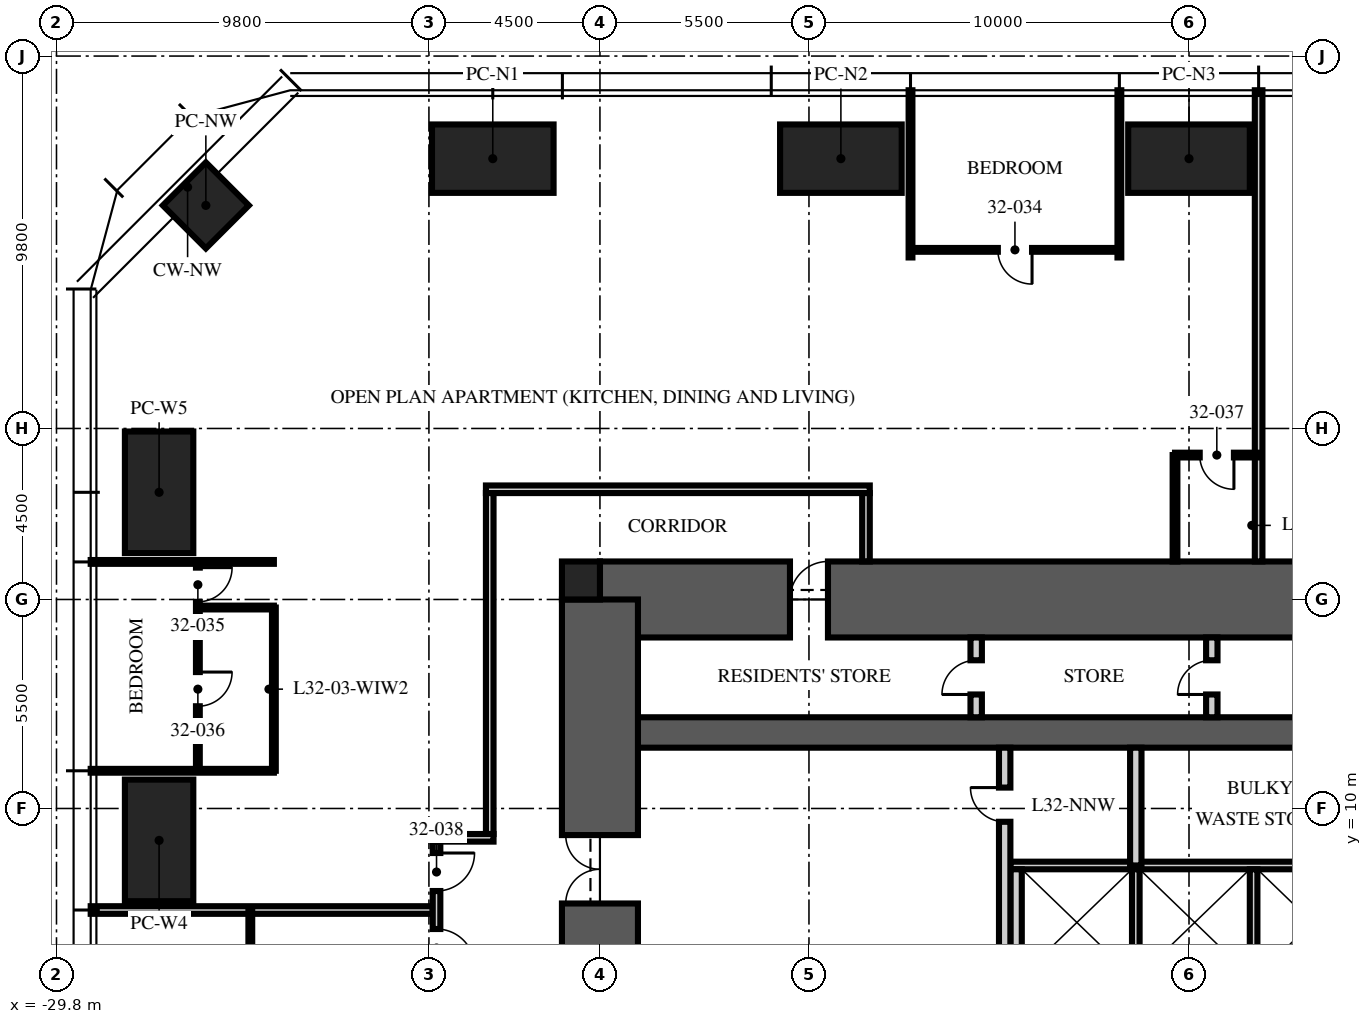
"""IFC4 building model, lengths in metres.
Left out: names, types, materials, properties, quantities, classifications, styles, units other than length and angle.
Written with IfcOpenShell. Run it as: python <this file> out.ifc"""

import sys

from ifc_helpers import new_model, si_unit, direction, frame, frame_2d, origin, origin_2d, place, context, subcontext, project, spatial, rectangle, extrude, element, fill, save


model = new_model("IFC4")
c1 = context("Model", 3, precision=1e-05, world=origin(), true_north=direction((0.0, 1.0)))
c2 = subcontext(c1, "Body", "Model", "MODEL_VIEW")
j1 = project(units=[si_unit("LENGTHUNIT", "METRE"), si_unit("PLANEANGLEUNIT", "RADIAN")], contexts=[c1])
p1 = place(None, origin())
s1 = spatial("IfcSite", under=j1, at=p1, CompositionType="ELEMENT")
p2 = place(p1, origin())
s2 = spatial("IfcBuilding", under=s1, at=p2, CompositionType="ELEMENT")
p3 = place(p2, frame((0.0, 0.0, 129.75)))
s3 = spatial("IfcBuildingStorey", under=s2, at=p3, CompositionType="ELEMENT", Elevation=129.75)
p4 = place(p3, frame((-15.5, 15.5, -0.25), z_axis=(0.0, 0.0, 1.0), x_axis=(1.0, 0.0, 0.0)))
e1 = element("IfcWall", 1, at=p4, inside=s3, PredefinedType="SHEAR", context=c2, shape_type="SweptSolid", body=[
    extrude(rectangle(XDim=31.0, YDim=2.0, at=frame_2d((15.5, 0.0))), origin(), (0.0, 0.0, 1.0), 3.75),
])
p5 = place(p4, frame((5.0, 0.0, 0.25)))
e2 = element("IfcOpeningElement", 2, at=p5, cuts=e1, PredefinedType="OPENING", context=c2, shape_type="SweptSolid", body=[
    extrude(rectangle(XDim=1.0, YDim=2.1, at=frame_2d((0.5, 1.05))), frame((0.0, 1.01, 0.0), z_axis=(0.0, -1.0, 0.0), x_axis=(1.0, 0.0, 0.0)), (0.0, 0.0, 1.0), 2.02),
])
p6 = place(p3, frame((-15.5, 12.0, -0.25), z_axis=(0.0, 0.0, 1.0), x_axis=(1.0, 0.0, 0.0)))
e3 = element("IfcWall", 3, at=p6, inside=s3, PredefinedType="SHEAR", context=c2, shape_type="SweptSolid", body=[
    extrude(rectangle(XDim=31.0, YDim=0.8, at=frame_2d((15.5, 0.0))), origin(), (0.0, 0.0, 1.0), 3.75),
])
p7 = place(p3, frame((-15.5, -15.5, -0.25), z_axis=(0.0, 0.0, 1.0), x_axis=(0.0, 1.0, 0.0)))
e4 = element("IfcWall", 4, at=p7, inside=s3, PredefinedType="SHEAR", context=c2, shape_type="SweptSolid", body=[
    extrude(rectangle(XDim=31.0, YDim=2.0, at=frame_2d((15.5, 0.0))), origin(), (0.0, 0.0, 1.0), 3.75),
])
p8 = place(p7, frame((6.5, 0.0, 0.25)))
e5 = element("IfcOpeningElement", 5, at=p8, cuts=e4, PredefinedType="OPENING", context=c2, shape_type="SweptSolid", body=[
    extrude(rectangle(XDim=1.2, YDim=2.1, at=frame_2d((0.6, 1.05))), frame((0.0, 1.01, 0.0), z_axis=(0.0, -1.0, 0.0), x_axis=(1.0, 0.0, 0.0)), (0.0, 0.0, 1.0), 2.02),
])
p9 = place(p7, frame((23.0, 0.0, 0.25)))
e6 = element("IfcOpeningElement", 6, at=p9, cuts=e4, PredefinedType="OPENING", context=c2, shape_type="SweptSolid", body=[
    extrude(rectangle(XDim=1.8, YDim=2.1, at=frame_2d((0.9, 1.05))), frame((0.0, 1.01, 0.0), z_axis=(0.0, -1.0, 0.0), x_axis=(1.0, 0.0, 0.0)), (0.0, 0.0, 1.0), 2.02),
])
p10 = place(p3, frame((-16.0, 16.0, -0.25), z_axis=(0.0, 0.0, 1.0), x_axis=(1.0, 0.0, 0.0)))
e7 = element("IfcColumn", 7, at=p10, inside=s3, PredefinedType="COLUMN", context=c2, shape_type="SweptSolid", body=[
    extrude(rectangle(XDim=1.0, YDim=1.0, at=origin_2d()), origin(), (0.0, 0.0, 1.0), 3.75),
])
for number, where, z_axis, x_axis in (
    (8, (-18.32, 27.1, 0.0), (0.0, 0.0, 1.0), (1.0, 0.0, 0.0)),
    (9, (-9.16, 27.1, 0.0), (0.0, 0.0, 1.0), (1.0, 0.0, 0.0)),
    (10, (0.0, 27.1, 0.0), (0.0, 0.0, 1.0), (1.0, 0.0, 0.0)),
    (11, (-27.1, 9.16, 0.0), (0.0, 0.0, 1.0), (0.0, 1.0, 0.0)),
    (12, (-27.1, 18.32, 0.0), (0.0, 0.0, 1.0), (0.0, 1.0, 0.0)),
):
    element("IfcColumn", number, at=place(p3, frame(where, z_axis=z_axis, x_axis=x_axis)), inside=s3, PredefinedType="COLUMN", context=c2, shape_type="SweptSolid", body=[
        extrude(rectangle(XDim=3.2, YDim=1.8, at=origin_2d()), origin(), (0.0, 0.0, 1.0), 3.75),
    ])
p11 = place(p3, frame((-25.87, 25.87, 0.0), z_axis=(0.0, 0.0, 1.0), x_axis=(0.707106781187, 0.707106781187, 0.0)))
e13 = element("IfcColumn", 13, at=p11, inside=s3, PredefinedType="COLUMN", context=c2, shape_type="SweptSolid", body=[
    extrude(rectangle(XDim=1.6, YDim=1.6, at=origin_2d()), origin(), (0.0, 0.0, 1.0), 3.75),
])
p12 = place(p3, frame((-4.7, 8.5, 0.0), z_axis=(0.0, 0.0, 1.0), x_axis=(1.0, 0.0, 0.0)))
e14 = element("IfcWall", 14, at=p12, inside=s3, PredefinedType="PARTITIONING", context=c2, shape_type="SweptSolid", body=[
    extrude(rectangle(XDim=9.7, YDim=0.2, at=frame_2d((4.85, 0.0))), origin(), (0.0, 0.0, 1.0), 3.5),
])
p13 = place(p3, frame((-4.55, 5.6, 0.0), z_axis=(0.0, 0.0, 1.0), x_axis=(0.0, 1.0, 0.0)))
e15 = element("IfcWall", 15, at=p13, inside=s3, PredefinedType="PARTITIONING", context=c2, shape_type="SweptSolid", body=[
    extrude(rectangle(XDim=2.8, YDim=0.3, at=frame_2d((1.4, 0.0))), origin(), (0.0, 0.0, 1.0), 3.5),
])
for number, where, z_axis, x_axis in (
    (16, (-1.4, 5.6, 0.0), (0.0, 0.0, 1.0), (0.0, 1.0, 0.0)),
    (17, (1.7, 5.6, 0.0), (0.0, 0.0, 1.0), (0.0, 1.0, 0.0)),
):
    element("IfcWall", number, at=place(p3, frame(where, z_axis=z_axis, x_axis=x_axis)), inside=s3, PredefinedType="PARTITIONING", context=c2, shape_type="SweptSolid", body=[
        extrude(rectangle(XDim=2.8, YDim=0.2, at=frame_2d((1.4, 0.0))), origin(), (0.0, 0.0, 1.0), 3.5),
    ])
p14 = place(p3, frame((-4.85, 5.3, 0.0), z_axis=(0.0, 0.0, 1.0), x_axis=(0.0, 1.0, 0.0)))
e18 = element("IfcWall", 18, at=p14, inside=s3, PredefinedType="PARTITIONING", context=c2, shape_type="SweptSolid", body=[
    extrude(rectangle(XDim=6.3, YDim=0.3, at=frame_2d((3.15, 0.0))), origin(), (0.0, 0.0, 1.0), 3.5),
])
p15 = place(p14, frame((4.35, 0.0, 0.0)))
e19 = element("IfcOpeningElement", 19, at=p15, cuts=e18, PredefinedType="OPENING", context=c2, shape_type="SweptSolid", body=[
    extrude(rectangle(XDim=0.9, YDim=2.1, at=frame_2d((0.45, 1.05))), frame((0.0, 0.16, 0.0), z_axis=(0.0, -1.0, 0.0), x_axis=(1.0, 0.0, 0.0)), (0.0, 0.0, 1.0), 0.32),
])
p16 = place(p3, frame((-1.4, 8.5, 0.0), z_axis=(0.0, 0.0, 1.0), x_axis=(0.0, 1.0, 0.0)))
e20 = element("IfcWall", 20, at=p16, inside=s3, PredefinedType="PARTITIONING", context=c2, shape_type="SweptSolid", body=[
    extrude(rectangle(XDim=3.1, YDim=0.3, at=frame_2d((1.55, 0.0))), origin(), (0.0, 0.0, 1.0), 3.5),
])
p17 = place(p3, frame((-5.6, 12.4, 0.0), z_axis=(0.0, 0.0, 1.0), x_axis=(0.0, 1.0, 0.0)))
e21 = element("IfcWall", 21, at=p17, inside=s3, PredefinedType="PARTITIONING", context=c2, shape_type="SweptSolid", body=[
    extrude(rectangle(XDim=2.1, YDim=0.3, at=frame_2d((1.05, 0.0))), origin(), (0.0, 0.0, 1.0), 3.5),
])
p18 = place(p17, frame((0.6, 0.0, 0.0)))
e22 = element("IfcOpeningElement", 22, at=p18, cuts=e21, PredefinedType="OPENING", context=c2, shape_type="SweptSolid", body=[
    extrude(rectangle(XDim=0.9, YDim=2.1, at=frame_2d((0.45, 1.05))), frame((0.0, 0.16, 0.0), z_axis=(0.0, -1.0, 0.0), x_axis=(1.0, 0.0, 0.0)), (0.0, 0.0, 1.0), 0.32),
])
p19 = place(p3, frame((0.6, 12.4, 0.0), z_axis=(0.0, 0.0, 1.0), x_axis=(0.0, 1.0, 0.0)))
e23 = element("IfcWall", 23, at=p19, inside=s3, PredefinedType="PARTITIONING", context=c2, shape_type="SweptSolid", body=[
    extrude(rectangle(XDim=2.1, YDim=0.3, at=frame_2d((1.05, 0.0))), origin(), (0.0, 0.0, 1.0), 3.5),
])
p20 = place(p19, frame((0.6, 0.0, 0.0)))
e24 = element("IfcOpeningElement", 24, at=p20, cuts=e23, PredefinedType="OPENING", context=c2, shape_type="SweptSolid", body=[
    extrude(rectangle(XDim=0.9, YDim=2.1, at=frame_2d((0.45, 1.05))), frame((0.0, 0.16, 0.0), z_axis=(0.0, -1.0, 0.0), x_axis=(1.0, 0.0, 0.0)), (0.0, 0.0, 1.0), 0.32),
])
p21 = place(p3, frame((-18.5, 18.4, 0.0), z_axis=(0.0, 0.0, 1.0), x_axis=(1.0, 0.0, 0.0)))
e25 = element("IfcWall", 25, at=p21, inside=s3, PredefinedType="PARTITIONING", context=c2, shape_type="SweptSolid", body=[
    extrude(rectangle(XDim=10.1, YDim=0.2, at=frame_2d((5.05, 0.0))), origin(), (0.0, 0.0, 1.0), 2.3),
])
p22 = place(p3, frame((-8.5, 18.3, 0.0), z_axis=(0.0, 0.0, 1.0), x_axis=(0.0, -1.0, 0.0)))
e26 = element("IfcWall", 26, at=p22, inside=s3, PredefinedType="PARTITIONING", context=c2, shape_type="SweptSolid", body=[
    extrude(rectangle(XDim=1.8, YDim=0.2, at=frame_2d((0.9, 0.0))), origin(), (0.0, 0.0, 1.0), 3.5),
])
p23 = place(p3, frame((1.832, 16.5, 0.0), z_axis=(0.0, 0.0, 1.0), x_axis=(0.0, 1.0, 0.0)))
e27 = element("IfcWall", 27, at=p23, inside=s3, PredefinedType="PARTITIONING", context=c2, shape_type="SweptSolid", body=[
    extrude(rectangle(XDim=12.4, YDim=0.2, at=frame_2d((6.2, 0.0))), origin(), (0.0, 0.0, 1.0), 2.81),
])
for number, where, z_axis, x_axis in (
    (28, (-1.832, 24.5, 0.0), (0.0, 0.0, 1.0), (0.0, 1.0, 0.0)),
    (29, (-7.328, 24.5, 0.0), (0.0, 0.0, 1.0), (0.0, 1.0, 0.0)),
):
    element("IfcWall", number, at=place(p3, frame(where, z_axis=z_axis, x_axis=x_axis)), inside=s3, PredefinedType="PARTITIONING", context=c2, shape_type="SweptSolid", body=[
        extrude(rectangle(XDim=4.4, YDim=0.1, at=frame_2d((2.2, 0.0))), origin(), (0.0, 0.0, 1.0), 2.81),
    ])
for number, where, z_axis, x_axis in (
    (30, (-24.08, 16.488, 0.0), (0.0, 0.0, 1.0), (-1.0, 0.0, 0.0)),
    (31, (-24.08, 10.992, 0.0), (0.0, 0.0, 1.0), (-1.0, 0.0, 0.0)),
):
    element("IfcWall", number, at=place(p3, frame(where, z_axis=z_axis, x_axis=x_axis)), inside=s3, PredefinedType="PARTITIONING", context=c2, shape_type="SweptSolid", body=[
        extrude(rectangle(XDim=4.82, YDim=0.1, at=frame_2d((2.41, 0.0))), origin(), (0.0, 0.0, 1.0), 2.81),
    ])
p24 = place(p3, frame((-19.9, 7.328, 0.0), z_axis=(0.0, 0.0, 1.0), x_axis=(-1.0, 0.0, 0.0)))
e32 = element("IfcWall", 32, at=p24, inside=s3, PredefinedType="PARTITIONING", context=c2, shape_type="SweptSolid", body=[
    extrude(rectangle(XDim=9.0, YDim=0.2, at=frame_2d((4.5, 0.0))), origin(), (0.0, 0.0, 1.0), 2.81),
])
p25 = place(p3, frame((-1.832, 24.7, 0.0), z_axis=(0.0, 0.0, 1.0), x_axis=(-1.0, 0.0, 0.0)))
e33 = element("IfcWall", 33, at=p25, inside=s3, PredefinedType="PARTITIONING", context=c2, shape_type="SweptSolid", body=[
    extrude(rectangle(XDim=5.496, YDim=0.1, at=frame_2d((2.748, 0.0))), origin(), (0.0, 0.0, 1.0), 2.81),
])
p26 = place(p25, frame((2.298, 0.0, 0.0)))
e34 = element("IfcOpeningElement", 34, at=p26, cuts=e33, PredefinedType="OPENING", context=c2, shape_type="SweptSolid", body=[
    extrude(rectangle(XDim=0.9, YDim=2.1, at=frame_2d((0.45, 1.05))), frame((0.0, 0.06, 0.0), z_axis=(0.0, -1.0, 0.0), x_axis=(1.0, 0.0, 0.0)), (0.0, 0.0, 1.0), 0.12),
])
p27 = place(p3, frame((-26.08, 16.488, 0.0), z_axis=(0.0, 0.0, 1.0), x_axis=(0.0, -1.0, 0.0)))
e35 = element("IfcWall", 35, at=p27, inside=s3, PredefinedType="PARTITIONING", context=c2, shape_type="SweptSolid", body=[
    extrude(rectangle(XDim=5.496, YDim=0.1, at=frame_2d((2.748, 0.0))), origin(), (0.0, 0.0, 1.0), 2.81),
])
p28 = place(p27, frame((0.15, 0.0, 0.0)))
e36 = element("IfcOpeningElement", 36, at=p28, cuts=e35, PredefinedType="OPENING", context=c2, shape_type="SweptSolid", body=[
    extrude(rectangle(XDim=0.9, YDim=2.1, at=frame_2d((0.45, 1.05))), frame((0.0, 0.06, 0.0), z_axis=(0.0, -1.0, 0.0), x_axis=(1.0, 0.0, 0.0)), (0.0, 0.0, 1.0), 0.12),
])
p29 = place(p27, frame((2.898, 0.0, 0.0)))
e37 = element("IfcOpeningElement", 37, at=p29, cuts=e35, PredefinedType="OPENING", context=c2, shape_type="SweptSolid", body=[
    extrude(rectangle(XDim=0.9, YDim=2.1, at=frame_2d((0.45, 1.05))), frame((0.0, 0.06, 0.0), z_axis=(0.0, -1.0, 0.0), x_axis=(1.0, 0.0, 0.0)), (0.0, 0.0, 1.0), 0.12),
])
p30 = place(p3, frame((-24.08, 15.288, 0.0), z_axis=(0.0, 0.0, 1.0), x_axis=(-1.0, 0.0, 0.0)))
e38 = element("IfcWall", 38, at=p30, inside=s3, PredefinedType="PARTITIONING", context=c2, shape_type="SweptSolid", body=[
    extrude(rectangle(XDim=2.0, YDim=0.1, at=frame_2d((1.0, 0.0))), origin(), (0.0, 0.0, 1.0), 3.5),
])
p31 = place(p3, frame((-24.08, 15.288, 0.0), z_axis=(0.0, 0.0, 1.0), x_axis=(0.0, -1.0, 0.0)))
e39 = element("IfcWall", 39, at=p31, inside=s3, PredefinedType="PARTITIONING", context=c2, shape_type="SweptSolid", body=[
    extrude(rectangle(XDim=4.296, YDim=0.1, at=frame_2d((2.148, 0.0))), origin(), (0.0, 0.0, 1.0), 2.81),
])
p32 = place(p3, frame((1.832, 19.3, 0.0), z_axis=(0.0, 0.0, 1.0), x_axis=(-1.0, 0.0, 0.0)))
e40 = element("IfcWall", 40, at=p32, inside=s3, PredefinedType="PARTITIONING", context=c2, shape_type="SweptSolid", body=[
    extrude(rectangle(XDim=2.2, YDim=0.125, at=frame_2d((1.1, 0.0))), origin(), (0.0, 0.0, 1.0), 2.7),
])
p33 = place(p32, frame((0.65, 0.0, 0.0)))
e41 = element("IfcOpeningElement", 41, at=p33, cuts=e40, PredefinedType="OPENING", context=c2, shape_type="SweptSolid", body=[
    extrude(rectangle(XDim=0.9, YDim=2.1, at=frame_2d((0.45, 1.05))), frame((0.0, 0.073, 0.0), z_axis=(0.0, -1.0, 0.0), x_axis=(1.0, 0.0, 0.0)), (0.0, 0.0, 1.0), 0.145),
])
p34 = place(p3, frame((-0.368, 16.5, 0.0), z_axis=(0.0, 0.0, 1.0), x_axis=(0.0, 1.0, 0.0)))
e42 = element("IfcWall", 42, at=p34, inside=s3, PredefinedType="PARTITIONING", context=c2, shape_type="SweptSolid", body=[
    extrude(rectangle(XDim=2.8, YDim=0.125, at=frame_2d((1.4, 0.0))), origin(), (0.0, 0.0, 1.0), 3.5),
])
p35 = place(p3, frame((-24.7, 7.328, 0.0), z_axis=(0.0, 0.0, 1.0), x_axis=(0.0, -1.0, 0.0)))
e43 = element("IfcWall", 43, at=p35, inside=s3, PredefinedType="PARTITIONING", context=c2, shape_type="SweptSolid", body=[
    extrude(rectangle(XDim=5.496, YDim=0.1, at=frame_2d((2.748, 0.0))), origin(), (0.0, 0.0, 1.0), 2.81),
])
p36 = place(p35, frame((2.298, 0.0, 0.0)))
e44 = element("IfcOpeningElement", 44, at=p36, cuts=e43, PredefinedType="OPENING", context=c2, shape_type="SweptSolid", body=[
    extrude(rectangle(XDim=0.9, YDim=2.1, at=frame_2d((0.45, 1.05))), frame((0.0, 0.06, 0.0), z_axis=(0.0, -1.0, 0.0), x_axis=(1.0, 0.0, 0.0)), (0.0, 0.0, 1.0), 0.12),
])
p37 = place(p3, frame((-18.4, 18.3, 0.0), z_axis=(0.0, 0.0, 1.0), x_axis=(0.0, -1.0, 0.0)))
e45 = element("IfcWall", 45, at=p37, inside=s3, PredefinedType="PARTITIONING", context=c2, shape_type="SweptSolid", body=[
    extrude(rectangle(XDim=8.972, YDim=0.2, at=frame_2d((4.486, 0.0))), origin(), (0.0, 0.0, 1.0), 2.3),
])
p38 = place(p3, frame((-18.3, 9.228, 0.0), z_axis=(0.0, 0.0, 1.0), x_axis=(-1.0, 0.0, 0.0)))
e46 = element("IfcWall", 46, at=p38, inside=s3, PredefinedType="PARTITIONING", context=c2, shape_type="SweptSolid", body=[
    extrude(rectangle(XDim=1.6, YDim=0.2, at=frame_2d((0.8, 0.0))), origin(), (0.0, 0.0, 1.0), 2.7),
])
p39 = place(p3, frame((-19.8, 9.128, 0.0), z_axis=(0.0, 0.0, 1.0), x_axis=(0.0, -1.0, 0.0)))
e47 = element("IfcWall", 47, at=p39, inside=s3, PredefinedType="PARTITIONING", context=c2, shape_type="SweptSolid", body=[
    extrude(rectangle(XDim=3.6, YDim=0.2, at=frame_2d((1.8, 0.0))), origin(), (0.0, 0.0, 1.0), 2.7),
])
p40 = place(p39, frame((0.3, 0.0, 0.0)))
e48 = element("IfcOpeningElement", 48, at=p40, cuts=e47, PredefinedType="OPENING", context=c2, shape_type="SweptSolid", body=[
    extrude(rectangle(XDim=1.0, YDim=2.2, at=frame_2d((0.5, 1.1))), frame((0.0, 0.11, 0.0), z_axis=(0.0, -1.0, 0.0), x_axis=(1.0, 0.0, 0.0)), (0.0, 0.0, 1.0), 0.22),
])
p41 = place(p39, frame((2.3, 0.0, 0.0)))
e49 = element("IfcOpeningElement", 49, at=p41, cuts=e47, PredefinedType="OPENING", context=c2, shape_type="SweptSolid", body=[
    extrude(rectangle(XDim=1.0, YDim=2.2, at=frame_2d((0.5, 1.1))), frame((0.0, 0.11, 0.0), z_axis=(0.0, -1.0, 0.0), x_axis=(1.0, 0.0, 0.0)), (0.0, 0.0, 1.0), 0.22),
])
p42 = place(p9, origin())
e50 = element("IfcDoor", 50, at=p42, inside=s3, OperationType="DOUBLE_DOOR_SINGLE_SWING", PredefinedType="DOOR", context=c2, shape_type="SweptSolid", body=[
    extrude(rectangle(XDim=1.8, YDim=2.1, at=frame_2d((0.9, 1.05))), frame((0.0, 0.025, 0.0), z_axis=(0.0, -1.0, 0.0), x_axis=(1.0, 0.0, 0.0)), (0.0, 0.0, 1.0), 0.05),
])
fill(e6, e50)
p43 = place(p15, origin())
e51 = element("IfcDoor", 51, at=p43, inside=s3, OperationType="SINGLE_SWING_RIGHT", PredefinedType="DOOR", context=c2, shape_type="SweptSolid", body=[
    extrude(rectangle(XDim=0.9, YDim=2.1, at=frame_2d((0.45, 1.05))), frame((0.0, 0.025, 0.0), z_axis=(0.0, -1.0, 0.0), x_axis=(1.0, 0.0, 0.0)), (0.0, 0.0, 1.0), 0.05),
])
fill(e19, e51)
p44 = place(p18, origin())
e52 = element("IfcDoor", 52, at=p44, inside=s3, OperationType="SINGLE_SWING_LEFT", PredefinedType="DOOR", context=c2, shape_type="SweptSolid", body=[
    extrude(rectangle(XDim=0.9, YDim=2.1, at=frame_2d((0.45, 1.05))), frame((0.0, 0.025, 0.0), z_axis=(0.0, -1.0, 0.0), x_axis=(1.0, 0.0, 0.0)), (0.0, 0.0, 1.0), 0.05),
])
fill(e22, e52)
p45 = place(p20, origin())
e53 = element("IfcDoor", 53, at=p45, inside=s3, OperationType="SINGLE_SWING_LEFT", PredefinedType="DOOR", context=c2, shape_type="SweptSolid", body=[
    extrude(rectangle(XDim=0.9, YDim=2.1, at=frame_2d((0.45, 1.05))), frame((0.0, 0.025, 0.0), z_axis=(0.0, -1.0, 0.0), x_axis=(1.0, 0.0, 0.0)), (0.0, 0.0, 1.0), 0.05),
])
fill(e24, e53)
p46 = place(p5, origin())
e54 = element("IfcDoor", 54, at=p46, inside=s3, OperationType="SINGLE_SWING_RIGHT", PredefinedType="DOOR", context=c2, shape_type="SweptSolid", body=[
    extrude(rectangle(XDim=1.0, YDim=2.1, at=frame_2d((0.5, 1.05))), frame((0.0, 0.025, 0.0), z_axis=(0.0, -1.0, 0.0), x_axis=(1.0, 0.0, 0.0)), (0.0, 0.0, 1.0), 0.05),
])
fill(e2, e54)
p47 = place(p26, origin())
e55 = element("IfcDoor", 55, at=p47, inside=s3, OperationType="SINGLE_SWING_LEFT", PredefinedType="DOOR", context=c2, shape_type="SweptSolid", body=[
    extrude(rectangle(XDim=0.9, YDim=2.1, at=frame_2d((0.45, 1.05))), frame((0.0, 0.025, 0.0), z_axis=(0.0, -1.0, 0.0), x_axis=(1.0, 0.0, 0.0)), (0.0, 0.0, 1.0), 0.05),
])
fill(e34, e55)
p48 = place(p28, origin())
e56 = element("IfcDoor", 56, at=p48, inside=s3, OperationType="SINGLE_SWING_LEFT", PredefinedType="DOOR", context=c2, shape_type="SweptSolid", body=[
    extrude(rectangle(XDim=0.9, YDim=2.1, at=frame_2d((0.45, 1.05))), frame((0.0, 0.025, 0.0), z_axis=(0.0, -1.0, 0.0), x_axis=(1.0, 0.0, 0.0)), (0.0, 0.0, 1.0), 0.05),
])
fill(e36, e56)
p49 = place(p29, origin())
e57 = element("IfcDoor", 57, at=p49, inside=s3, OperationType="SINGLE_SWING_LEFT", PredefinedType="DOOR", context=c2, shape_type="SweptSolid", body=[
    extrude(rectangle(XDim=0.9, YDim=2.1, at=frame_2d((0.45, 1.05))), frame((0.0, 0.025, 0.0), z_axis=(0.0, -1.0, 0.0), x_axis=(1.0, 0.0, 0.0)), (0.0, 0.0, 1.0), 0.05),
])
fill(e37, e57)
p50 = place(p33, origin())
e58 = element("IfcDoor", 58, at=p50, inside=s3, OperationType="SINGLE_SWING_LEFT", PredefinedType="DOOR", context=c2, shape_type="SweptSolid", body=[
    extrude(rectangle(XDim=0.9, YDim=2.1, at=frame_2d((0.45, 1.05))), frame((0.0, 0.025, 0.0), z_axis=(0.0, -1.0, 0.0), x_axis=(1.0, 0.0, 0.0)), (0.0, 0.0, 1.0), 0.05),
])
fill(e41, e58)
p51 = place(p40, origin())
e59 = element("IfcDoor", 59, at=p51, inside=s3, OperationType="SINGLE_SWING_LEFT", PredefinedType="DOOR", context=c2, shape_type="SweptSolid", body=[
    extrude(rectangle(XDim=1.0, YDim=2.2, at=frame_2d((0.5, 1.1))), frame((0.0, 0.025, 0.0), z_axis=(0.0, -1.0, 0.0), x_axis=(1.0, 0.0, 0.0)), (0.0, 0.0, 1.0), 0.05),
])
fill(e48, e59)
p52 = place(p41, origin())
e60 = element("IfcDoor", 60, at=p52, inside=s3, OperationType="SINGLE_SWING_RIGHT", PredefinedType="DOOR", context=c2, shape_type="SweptSolid", body=[
    extrude(rectangle(XDim=1.0, YDim=2.2, at=frame_2d((0.5, 1.1))), frame((0.0, 0.025, 0.0), z_axis=(0.0, -1.0, 0.0), x_axis=(1.0, 0.0, 0.0)), (0.0, 0.0, 1.0), 0.05),
])
fill(e49, e60)
save(model, sys.argv[1])
